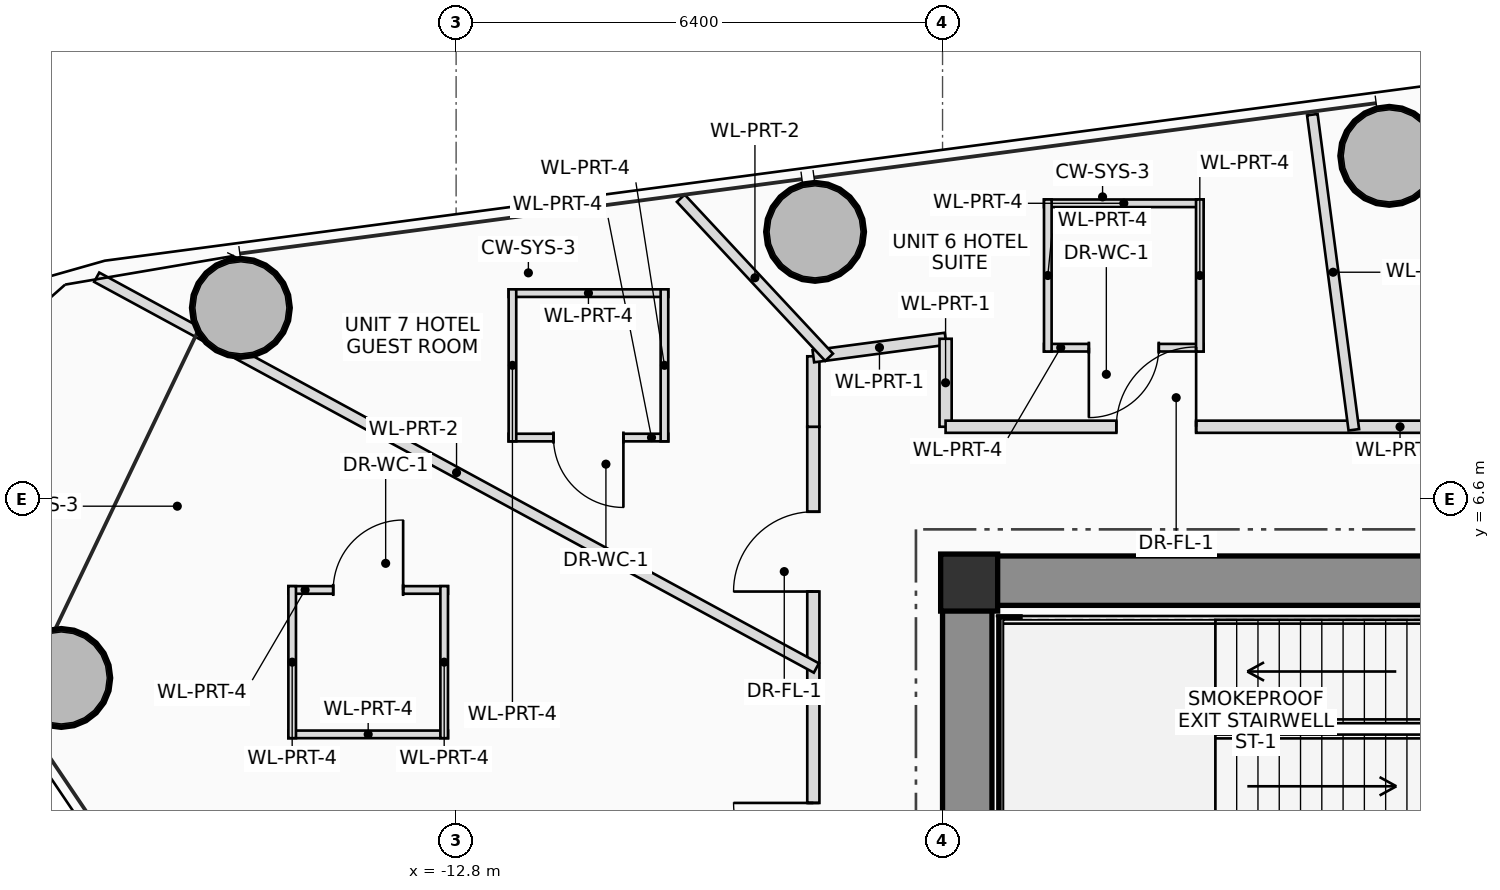
"""IFC4 building model, lengths in metres.
Left out: names, types, materials, properties, quantities, classifications, styles, units other than length and angle.
Written with IfcOpenShell. Run it as: python <this file> out.ifc"""

import sys

from ifc_helpers import new_model, si_unit, direction, frame, frame_2d, origin, origin_2d, place, context, subcontext, project, spatial, rectangle, hollow_circle, extrude, source, transform, mapped, element, fill, save


model = new_model("IFC4")
c1 = context("Model", 3, precision=1e-05, world=origin(), true_north=direction((0.0, 1.0)))
c2 = subcontext(c1, "Body", "Model", "MODEL_VIEW")
j1 = project(units=[si_unit("LENGTHUNIT", "METRE"), si_unit("PLANEANGLEUNIT", "RADIAN")], contexts=[c1])
p1 = place(None, origin())
s1 = spatial("IfcSite", under=j1, at=p1, CompositionType="ELEMENT")
p2 = place(p1, origin())
s2 = spatial("IfcBuilding", under=s1, at=p2, CompositionType="ELEMENT")
p3 = place(p2, frame((0.0, 0.0, 169.1)))
s3 = spatial("IfcBuildingStorey", under=s2, at=p3, CompositionType="ELEMENT", Elevation=169.1)
m1 = source(origin(), c2, "Body", "SweptSolid", [
    extrude(rectangle(XDim=0.75, YDim=0.75, at=origin_2d()), origin(), (0.0, 0.0, 1.0), 3.45),
])
p4 = place(p3, frame((-6.05, 5.5, 0.0), z_axis=(0.0, 0.0, 1.0), x_axis=(1.0, 0.0, 0.0)))
e1 = element("IfcColumn", 1, at=p4, inside=s3, PredefinedType="COLUMN", context=c2, shape_type="MappedRepresentation", body=[
    mapped(m1, transform((0.0, 0.0, 0.0), scale=1.0)),
])
p5 = place(p3, frame((-6.4, 5.525, 0.0), z_axis=(0.0, 0.0, 1.0), x_axis=(1.0, 0.0, 0.0)))
e2 = element("IfcWall", 2, at=p5, inside=s3, PredefinedType="SHEAR", context=c2, shape_type="SweptSolid", body=[
    extrude(rectangle(XDim=12.8, YDim=0.65, at=frame_2d((6.4, 0.0))), origin(), (0.0, 0.0, 1.0), 3.45),
])
p6 = place(p5, frame((8.6, 0.0, 0.0)))
e3 = element("IfcOpeningElement", 3, at=p6, cuts=e2, PredefinedType="OPENING", context=c2, shape_type="SweptSolid", body=[
    extrude(rectangle(XDim=1.2, YDim=2.2, at=frame_2d((0.6, 1.1))), frame((0.0, 0.335, 0.0), z_axis=(0.0, -1.0, 0.0), x_axis=(1.0, 0.0, 0.0)), (0.0, 0.0, 1.0), 0.67),
])
p7 = place(p3, frame((-6.075, 1.75, 0.0), z_axis=(0.0, 0.0, 1.0), x_axis=(0.0, 1.0, 0.0)))
e4 = element("IfcWall", 4, at=p7, inside=s3, PredefinedType="SHEAR", context=c2, shape_type="SweptSolid", body=[
    extrude(rectangle(XDim=3.45, YDim=0.65, at=frame_2d((1.725, 0.0))), origin(), (0.0, 0.0, 1.0), 3.45),
])
p8 = place(p3, frame((-5.52, 2.3, 0.0), z_axis=(0.0, 0.0, 1.0), x_axis=(0.0, 1.0, 0.0)))
e5 = element("IfcWall", 5, at=p8, inside=s3, PredefinedType="SHEAR", context=c2, shape_type="SweptSolid", body=[
    extrude(rectangle(XDim=2.75, YDim=0.28, at=frame_2d((1.375, 0.0))), origin(), (0.0, 0.0, 1.0), 3.45),
])
m2 = source(origin(), c2, "Body", "SweptSolid", [
    extrude(hollow_circle(Radius=0.65, WallThickness=0.045, at=origin_2d()), origin(), (0.0, 0.0, 1.0), 3.45),
])
for number, where, z_axis, x_axis in (
    (6, (-0.522, 11.114, 0.0), (0.0, 0.0, 1.0), (1.0, 0.0, 0.0)),
    (7, (-8.077, 10.114, 0.0), (0.0, 0.0, 1.0), (1.0, 0.0, 0.0)),
    (8, (-15.632, 9.114, 0.0), (0.0, 0.0, 1.0), (1.0, 0.0, 0.0)),
    (9, (-17.995, 4.245, 0.0), (0.0, 0.0, 1.0), (1.0, 0.0, 0.0)),
):
    element("IfcColumn", number, at=place(p3, frame(where, z_axis=z_axis, x_axis=x_axis)), inside=s3, PredefinedType="COLUMN", context=c2, shape_type="MappedRepresentation", body=[
        mapped(m2, transform((0.0, 0.0, 0.0), scale=1.0)),
    ])
p9 = place(p3, frame((-5.065, 10.49, 0.0), z_axis=(0.0, 0.0, 1.0), x_axis=(1.0, 0.0, 0.0)))
e10 = element("IfcWall", 10, at=p9, inside=s3, PredefinedType="PARTITIONING", context=c2, shape_type="SweptSolid", body=[
    extrude(rectangle(XDim=2.1, YDim=0.1, at=frame_2d((1.05, 0.0))), origin(), (0.0, 0.0, 1.0), 2.765),
])
p10 = place(p3, frame((-2.965, 8.59, 0.0), z_axis=(0.0, 0.0, 1.0), x_axis=(-1.0, 0.0, 0.0)))
e11 = element("IfcWall", 11, at=p10, inside=s3, PredefinedType="PARTITIONING", context=c2, shape_type="SweptSolid", body=[
    extrude(rectangle(XDim=2.1, YDim=0.1, at=frame_2d((1.05, 0.0))), origin(), (0.0, 0.0, 1.0), 2.605),
])
p11 = place(p10, frame((0.59, 0.0, 0.0)))
e12 = element("IfcOpeningElement", 12, at=p11, cuts=e11, PredefinedType="OPENING", context=c2, shape_type="SweptSolid", body=[
    extrude(rectangle(XDim=0.92, YDim=2.1, at=frame_2d((0.46, 1.05))), frame((0.0, 0.06, 0.0), z_axis=(0.0, -1.0, 0.0), x_axis=(1.0, 0.0, 0.0)), (0.0, 0.0, 1.0), 0.12),
])
p12 = place(p3, frame((-3.015, 10.54, 0.0), z_axis=(0.0, 0.0, 1.0), x_axis=(0.0, -1.0, 0.0)))
e13 = element("IfcWall", 13, at=p12, inside=s3, PredefinedType="PARTITIONING", context=c2, shape_type="SweptSolid", body=[
    extrude(rectangle(XDim=2.0, YDim=0.1, at=frame_2d((1.0, 0.0))), origin(), (0.0, 0.0, 1.0), 2.605),
])
p13 = place(p3, frame((-5.015, 8.54, 0.0), z_axis=(0.0, 0.0, 1.0), x_axis=(0.0, 1.0, 0.0)))
e14 = element("IfcWall", 14, at=p13, inside=s3, PredefinedType="PARTITIONING", context=c2, shape_type="SweptSolid", body=[
    extrude(rectangle(XDim=2.0, YDim=0.1, at=frame_2d((1.0, 0.0))), origin(), (0.0, 0.0, 1.0), 2.765),
])
p14 = place(p3, frame((-12.109, 9.308, 0.0), z_axis=(0.0, 0.0, 1.0), x_axis=(1.0, 0.0, 0.0)))
e15 = element("IfcWall", 15, at=p14, inside=s3, PredefinedType="PARTITIONING", context=c2, shape_type="SweptSolid", body=[
    extrude(rectangle(XDim=2.1, YDim=0.1, at=frame_2d((1.05, 0.0))), origin(), (0.0, 0.0, 1.0), 3.25),
])
p15 = place(p3, frame((-10.009, 7.408, 0.0), z_axis=(0.0, 0.0, 1.0), x_axis=(-1.0, 0.0, 0.0)))
e16 = element("IfcWall", 16, at=p15, inside=s3, PredefinedType="PARTITIONING", context=c2, shape_type="SweptSolid", body=[
    extrude(rectangle(XDim=2.1, YDim=0.1, at=frame_2d((1.05, 0.0))), origin(), (0.0, 0.0, 1.0), 2.605),
])
p16 = place(p15, frame((0.59, 0.0, 0.0)))
e17 = element("IfcOpeningElement", 17, at=p16, cuts=e16, PredefinedType="OPENING", context=c2, shape_type="SweptSolid", body=[
    extrude(rectangle(XDim=0.92, YDim=2.1, at=frame_2d((0.46, 1.05))), frame((0.0, 0.06, 0.0), z_axis=(0.0, -1.0, 0.0), x_axis=(1.0, 0.0, 0.0)), (0.0, 0.0, 1.0), 0.12),
])
p17 = place(p3, frame((-10.059, 9.358, 0.0), z_axis=(0.0, 0.0, 1.0), x_axis=(0.0, -1.0, 0.0)))
e18 = element("IfcWall", 18, at=p17, inside=s3, PredefinedType="PARTITIONING", context=c2, shape_type="SweptSolid", body=[
    extrude(rectangle(XDim=2.0, YDim=0.1, at=frame_2d((1.0, 0.0))), origin(), (0.0, 0.0, 1.0), 2.805),
])
p18 = place(p3, frame((-12.059, 7.358, 0.0), z_axis=(0.0, 0.0, 1.0), x_axis=(0.0, 1.0, 0.0)))
e19 = element("IfcWall", 19, at=p18, inside=s3, PredefinedType="PARTITIONING", context=c2, shape_type="SweptSolid", body=[
    extrude(rectangle(XDim=2.0, YDim=0.1, at=frame_2d((1.0, 0.0))), origin(), (0.0, 0.0, 1.0), 2.605),
])
p19 = place(p3, frame((-15.007, 5.403, 0.0), z_axis=(0.0, 0.0, 1.0), x_axis=(1.0, 0.0, 0.0)))
e20 = element("IfcWall", 20, at=p19, inside=s3, PredefinedType="PARTITIONING", context=c2, shape_type="SweptSolid", body=[
    extrude(rectangle(XDim=2.1, YDim=0.1, at=frame_2d((1.05, 0.0))), origin(), (0.0, 0.0, 1.0), 2.905),
])
p20 = place(p19, frame((0.59, 0.0, 0.0)))
e21 = element("IfcOpeningElement", 21, at=p20, cuts=e20, PredefinedType="OPENING", context=c2, shape_type="SweptSolid", body=[
    extrude(rectangle(XDim=0.92, YDim=2.1, at=frame_2d((0.46, 1.05))), frame((0.0, 0.06, 0.0), z_axis=(0.0, -1.0, 0.0), x_axis=(1.0, 0.0, 0.0)), (0.0, 0.0, 1.0), 0.12),
])
p21 = place(p3, frame((-12.907, 3.503, 0.0), z_axis=(0.0, 0.0, 1.0), x_axis=(-1.0, 0.0, 0.0)))
e22 = element("IfcWall", 22, at=p21, inside=s3, PredefinedType="PARTITIONING", context=c2, shape_type="SweptSolid", body=[
    extrude(rectangle(XDim=2.1, YDim=0.1, at=frame_2d((1.05, 0.0))), origin(), (0.0, 0.0, 1.0), 2.905),
])
for number, where, z_axis, x_axis in (
    (23, (-12.957, 5.453, 0.0), (0.0, 0.0, 1.0), (0.0, -1.0, 0.0)),
    (24, (-14.957, 3.453, 0.0), (0.0, 0.0, 1.0), (0.0, 1.0, 0.0)),
):
    element("IfcWall", number, at=place(p3, frame(where, z_axis=z_axis, x_axis=x_axis)), inside=s3, PredefinedType="PARTITIONING", context=c2, shape_type="SweptSolid", body=[
        extrude(rectangle(XDim=2.0, YDim=0.1, at=frame_2d((1.0, 0.0))), origin(), (0.0, 0.0, 1.0), 2.605),
    ])
p22 = place(p3, frame((-8.1, -7.528, 0.0), z_axis=(0.0, 0.0, 1.0), x_axis=(0.0, 1.0, 0.0)))
e25 = element("IfcWall", 25, at=p22, inside=s3, PredefinedType="PARTITIONING", context=c2, shape_type="SweptSolid", body=[
    extrude(rectangle(XDim=15.078, YDim=0.16, at=frame_2d((7.539, 0.0))), origin(), (0.0, 0.0, 1.0), 2.605),
])
p23 = place(p22, frame((3.265, 0.0, 0.0)))
e26 = element("IfcOpeningElement", 26, at=p23, cuts=e25, PredefinedType="OPENING", context=c2, shape_type="SweptSolid", body=[
    extrude(rectangle(XDim=0.9, YDim=2.05, at=frame_2d((0.45, 1.025))), frame((0.0, 0.09, 0.0), z_axis=(0.0, -1.0, 0.0), x_axis=(1.0, 0.0, 0.0)), (0.0, 0.0, 1.0), 0.18),
])
p24 = place(p22, frame((9.079, 0.0, 0.0)))
e27 = element("IfcOpeningElement", 27, at=p24, cuts=e25, PredefinedType="OPENING", context=c2, shape_type="SweptSolid", body=[
    extrude(rectangle(XDim=1.05, YDim=2.2, at=frame_2d((0.525, 1.1))), frame((0.0, 0.09, 0.0), z_axis=(0.0, -1.0, 0.0), x_axis=(1.0, 0.0, 0.0)), (0.0, 0.0, 1.0), 0.18),
])
p25 = place(p22, frame((12.91, 0.0, 0.0)))
e28 = element("IfcOpeningElement", 28, at=p25, cuts=e25, PredefinedType="OPENING", context=c2, shape_type="SweptSolid", body=[
    extrude(rectangle(XDim=1.05, YDim=2.2, at=frame_2d((0.525, 1.1))), frame((0.0, 0.09, 0.0), z_axis=(0.0, -1.0, 0.0), x_axis=(1.0, 0.0, 0.0)), (0.0, 0.0, 1.0), 0.18),
])
p26 = place(p3, frame((-8.1, 7.55, 0.0), z_axis=(0.0, 0.0, 1.0), x_axis=(0.0, 1.0, 0.0)))
e29 = element("IfcWall", 29, at=p26, inside=s3, PredefinedType="PARTITIONING", context=c2, shape_type="SweptSolid", body=[
    extrude(rectangle(XDim=0.927, YDim=0.16, at=frame_2d((0.463, 0.0))), origin(), (0.0, 0.0, 1.0), 2.805),
])
p27 = place(p3, frame((-8.1, 8.477, 0.0), z_axis=(0.0, 0.0, 1.0), x_axis=(0.991341723558, 0.131307224223, 0.0)))
e30 = element("IfcWall", 30, at=p27, inside=s3, PredefinedType="PARTITIONING", context=c2, shape_type="SweptSolid", body=[
    extrude(rectangle(XDim=1.755, YDim=0.16, at=frame_2d((0.877, 0.0))), origin(), (0.0, 0.0, 1.0), 2.605),
])
p28 = place(p3, frame((-6.36, 8.708, 0.0), z_axis=(0.0, 0.0, 1.0), x_axis=(0.0, -1.0, 0.0)))
e31 = element("IfcWall", 31, at=p28, inside=s3, PredefinedType="PARTITIONING", context=c2, shape_type="SweptSolid", body=[
    extrude(rectangle(XDim=1.157, YDim=0.16, at=frame_2d((0.579, 0.0))), origin(), (0.0, 0.0, 1.0), 2.805),
])
p29 = place(p3, frame((-6.36, 7.55, 0.0), z_axis=(0.0, 0.0, 1.0), x_axis=(1.0, 0.0, 0.0)))
e32 = element("IfcWall", 32, at=p29, inside=s3, PredefinedType="PARTITIONING", context=c2, shape_type="SweptSolid", body=[
    extrude(rectangle(XDim=11.61, YDim=0.16, at=frame_2d((5.805, 0.0))), origin(), (0.0, 0.0, 1.0), 2.605),
])
p30 = place(p29, frame((2.246, 0.0, 0.0)))
e33 = element("IfcOpeningElement", 33, at=p30, cuts=e32, PredefinedType="OPENING", context=c2, shape_type="SweptSolid", body=[
    extrude(rectangle(XDim=1.05, YDim=2.2, at=frame_2d((0.525, 1.1))), frame((0.0, 0.09, 0.0), z_axis=(0.0, -1.0, 0.0), x_axis=(1.0, 0.0, 0.0)), (0.0, 0.0, 1.0), 0.18),
])
p31 = place(p29, frame((8.662, 0.0, 0.0)))
e34 = element("IfcOpeningElement", 34, at=p31, cuts=e32, PredefinedType="OPENING", context=c2, shape_type="SweptSolid", body=[
    extrude(rectangle(XDim=1.0, YDim=2.25, at=frame_2d((0.5, 1.125))), frame((0.0, 0.09, 0.0), z_axis=(0.0, -1.0, 0.0), x_axis=(1.0, 0.0, 0.0)), (0.0, 0.0, 1.0), 0.18),
])
p32 = place(p3, frame((-0.989, 7.51, 0.0), z_axis=(0.0, 0.0, 1.0), x_axis=(-0.130484717168, 0.991450320785, 0.0)))
e35 = element("IfcWall", 35, at=p32, inside=s3, PredefinedType="PARTITIONING", context=c2, shape_type="SweptSolid", body=[
    extrude(rectangle(XDim=4.182, YDim=0.14, at=frame_2d((2.091, 0.0))), origin(), (0.0, 0.0, 1.0), 2.605),
])
p33 = place(p3, frame((-7.893, 8.464, 0.0), z_axis=(0.0, 0.0, 1.0), x_axis=(-0.682011061147, 0.73134185746, 0.0)))
e36 = element("IfcWall", 36, at=p33, inside=s3, PredefinedType="PARTITIONING", context=c2, shape_type="SweptSolid", body=[
    extrude(rectangle(XDim=2.861, YDim=0.14, at=frame_2d((1.43, 0.0))), origin(), (0.0, 0.0, 1.0), 2.765),
])
p34 = place(p3, frame((-8.06, 4.376, 0.0), z_axis=(0.0, 0.0, 1.0), x_axis=(-0.878817054271, 0.477158867802, 0.0)))
e37 = element("IfcWall", 37, at=p34, inside=s3, PredefinedType="PARTITIONING", context=c2, shape_type="SweptSolid", body=[
    extrude(rectangle(XDim=10.774, YDim=0.14, at=frame_2d((5.387, 0.0))), origin(), (0.0, 0.0, 1.0), 2.605),
])
p35 = place(p11, origin())
e38 = element("IfcDoor", 38, at=p35, inside=s3, OperationType="SINGLE_SWING_RIGHT", PredefinedType="DOOR", context=c2, shape_type="SweptSolid", body=[
    extrude(rectangle(XDim=0.92, YDim=2.1, at=frame_2d((0.46, 1.05))), frame((0.0, 0.025, 0.0), z_axis=(0.0, -1.0, 0.0), x_axis=(1.0, 0.0, 0.0)), (0.0, 0.0, 1.0), 0.05),
])
fill(e12, e38)
p36 = place(p16, origin())
e39 = element("IfcDoor", 39, at=p36, inside=s3, OperationType="SINGLE_SWING_LEFT", PredefinedType="DOOR", context=c2, shape_type="SweptSolid", body=[
    extrude(rectangle(XDim=0.92, YDim=2.1, at=frame_2d((0.46, 1.05))), frame((0.0, 0.025, 0.0), z_axis=(0.0, -1.0, 0.0), x_axis=(1.0, 0.0, 0.0)), (0.0, 0.0, 1.0), 0.05),
])
fill(e17, e39)
p37 = place(p20, origin())
e40 = element("IfcDoor", 40, at=p37, inside=s3, OperationType="SINGLE_SWING_RIGHT", PredefinedType="DOOR", context=c2, shape_type="SweptSolid", body=[
    extrude(rectangle(XDim=0.92, YDim=2.1, at=frame_2d((0.46, 1.05))), frame((0.0, 0.025, 0.0), z_axis=(0.0, -1.0, 0.0), x_axis=(1.0, 0.0, 0.0)), (0.0, 0.0, 1.0), 0.05),
])
fill(e21, e40)
p38 = place(p24, origin())
e41 = element("IfcDoor", 41, at=p38, inside=s3, OperationType="SINGLE_SWING_RIGHT", PredefinedType="DOOR", context=c2, shape_type="SweptSolid", body=[
    extrude(rectangle(XDim=1.05, YDim=2.2, at=frame_2d((0.525, 1.1))), frame((0.0, 0.025, 0.0), z_axis=(0.0, -1.0, 0.0), x_axis=(1.0, 0.0, 0.0)), (0.0, 0.0, 1.0), 0.05),
])
fill(e27, e41)
p39 = place(p25, origin())
e42 = element("IfcDoor", 42, at=p39, inside=s3, OperationType="SINGLE_SWING_LEFT", PredefinedType="DOOR", context=c2, shape_type="SweptSolid", body=[
    extrude(rectangle(XDim=1.05, YDim=2.2, at=frame_2d((0.525, 1.1))), frame((0.0, 0.025, 0.0), z_axis=(0.0, -1.0, 0.0), x_axis=(1.0, 0.0, 0.0)), (0.0, 0.0, 1.0), 0.05),
])
fill(e28, e42)
p40 = place(p30, origin())
e43 = element("IfcDoor", 43, at=p40, inside=s3, OperationType="SINGLE_SWING_RIGHT", PredefinedType="DOOR", context=c2, shape_type="SweptSolid", body=[
    extrude(rectangle(XDim=1.05, YDim=2.2, at=frame_2d((0.525, 1.1))), frame((0.0, 0.025, 0.0), z_axis=(0.0, -1.0, 0.0), x_axis=(1.0, 0.0, 0.0)), (0.0, 0.0, 1.0), 0.05),
])
fill(e33, e43)
save(model, sys.argv[1])
